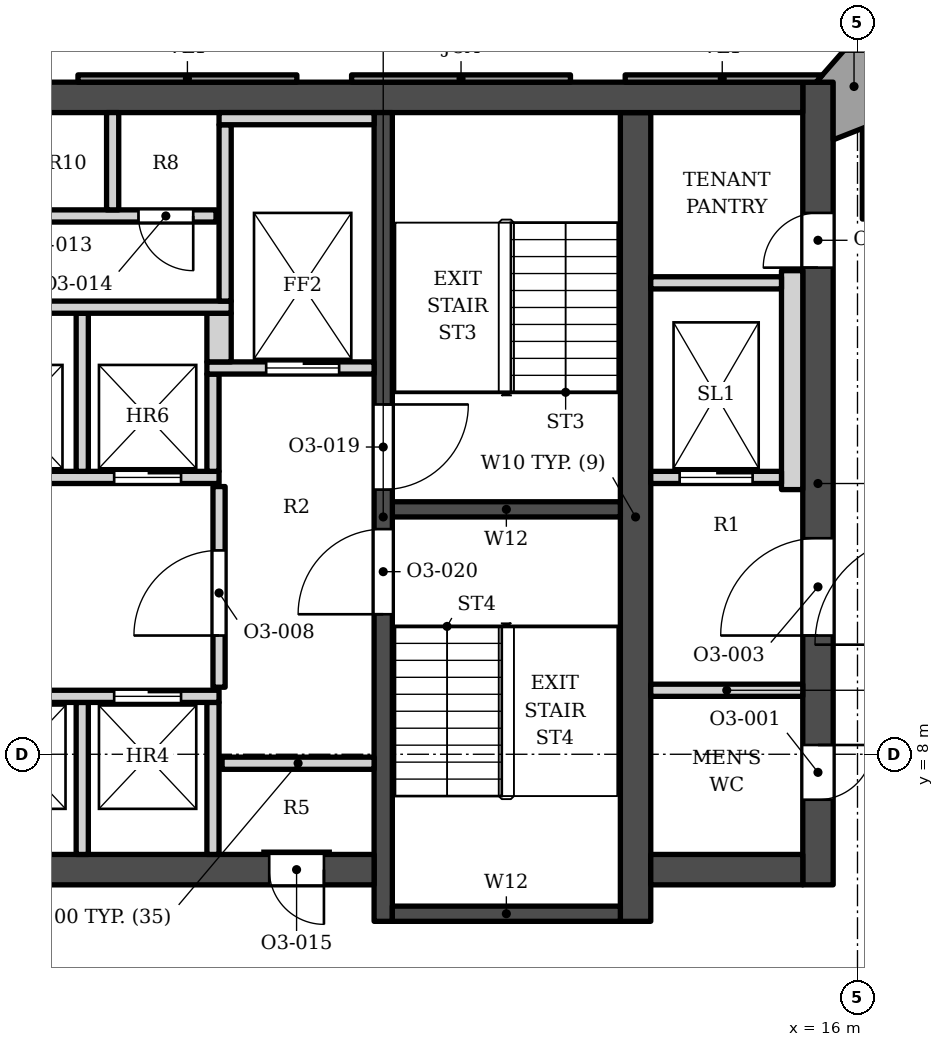
"""IFC4 building model, lengths in metres.
Left out: names, types, materials, properties, quantities, classifications, styles, units other than length and angle.
Written with IfcOpenShell. Run it as: python <this file> out.ifc"""

import sys

from ifc_helpers import new_model, si_unit, direction, frame, frame_2d, origin, place, context, subcontext, project, spatial, polyline, rectangle, outline, extrude, element, fill, save


model = new_model("IFC4")
c1 = context("Model", 3, precision=1e-05, world=origin(), true_north=direction((0.0, 1.0)))
c2 = subcontext(c1, "Body", "Model", "MODEL_VIEW")
j1 = project(units=[si_unit("LENGTHUNIT", "METRE"), si_unit("PLANEANGLEUNIT", "RADIAN")], contexts=[c1])
p1 = place(None, origin())
s1 = spatial("IfcSite", under=j1, at=p1, CompositionType="ELEMENT")
p2 = place(p1, origin())
s2 = spatial("IfcBuilding", under=s1, at=p2, CompositionType="ELEMENT")
p3 = place(p2, frame((0.0, 0.0, 168.0)))
s3 = spatial("IfcBuildingStorey", under=s2, at=p3, CompositionType="ELEMENT", Elevation=168.0)
p4 = place(p3, frame((-15.1, 18.802, 0.0), z_axis=(0.0, 0.0, 1.0), x_axis=(1.0, 0.0, 0.0)))
e1 = element("IfcWall", 1, at=p4, inside=s3, PredefinedType="SHEAR", context=c2, shape_type="SweptSolid", body=[
    extrude(rectangle(XDim=30.2, YDim=0.5, at=frame_2d((15.1, 0.0))), origin(), (0.0, 0.0, 1.0), 3.9),
])
p5 = place(p3, frame((12.35, 5.253, 0.0), z_axis=(0.0, 0.0, 1.0), x_axis=(0.0, 1.0, 0.0)))
e2 = element("IfcWall", 2, at=p5, inside=s3, PredefinedType="SHEAR", context=c2, shape_type="SweptSolid", body=[
    extrude(rectangle(XDim=13.3, YDim=0.5, at=frame_2d((6.65, 0.0))), origin(), (0.0, 0.0, 1.0), 3.9),
])
p6 = place(p3, frame((8.2, 5.253, 0.0), z_axis=(0.0, 0.0, 1.0), x_axis=(0.0, 1.0, 0.0)))
e3 = element("IfcWall", 3, at=p6, inside=s3, PredefinedType="SHEAR", context=c2, shape_type="SweptSolid", body=[
    extrude(rectangle(XDim=13.3, YDim=0.3, at=frame_2d((6.65, 0.0))), origin(), (0.0, 0.0, 1.0), 3.9),
])
p7 = place(p6, frame((7.1, 0.0, 0.0)))
e4 = element("IfcOpeningElement", 4, at=p7, cuts=e3, PredefinedType="OPENING", context=c2, shape_type="SweptSolid", body=[
    extrude(rectangle(XDim=1.4, YDim=2.1, at=frame_2d((0.7, 1.05))), frame((0.0, 0.16, 0.0), z_axis=(0.0, -1.0, 0.0), x_axis=(1.0, 0.0, 0.0)), (0.0, 0.0, 1.0), 0.32),
])
p8 = place(p6, frame((5.05, 0.0, 0.0)))
e5 = element("IfcOpeningElement", 5, at=p8, cuts=e3, PredefinedType="OPENING", context=c2, shape_type="SweptSolid", body=[
    extrude(rectangle(XDim=1.4, YDim=2.1, at=frame_2d((0.7, 1.05))), frame((0.0, 0.16, 0.0), z_axis=(0.0, -1.0, 0.0), x_axis=(1.0, 0.0, 0.0)), (0.0, 0.0, 1.0), 0.32),
])
for number, where, z_axis, x_axis in (
    (6, (8.35, 12.028, 0.0), (0.0, 0.0, 1.0), (1.0, 0.0, 0.0)),
    (7, (8.35, 5.378, 0.0), (0.0, 0.0, 1.0), (1.0, 0.0, 0.0)),
):
    element("IfcWall", number, at=place(p3, frame(where, z_axis=z_axis, x_axis=x_axis)), inside=s3, PredefinedType="SHEAR", context=c2, shape_type="SweptSolid", body=[
        extrude(rectangle(XDim=3.75, YDim=0.25, at=frame_2d((1.875, 0.0))), origin(), (0.0, 0.0, 1.0), 3.9),
    ])
p9 = place(p3, frame((1.0, 6.103, 0.0), z_axis=(0.0, 0.0, 1.0), x_axis=(1.0, 0.0, 0.0)))
e8 = element("IfcWall", 8, at=p9, inside=s3, PredefinedType="SHEAR", context=c2, shape_type="SweptSolid", body=[
    extrude(rectangle(XDim=7.05, YDim=0.5, at=frame_2d((3.525, 0.0))), origin(), (0.0, 0.0, 1.0), 3.9),
])
p10 = place(p9, frame((5.325, 0.0, 0.0)))
e9 = element("IfcOpeningElement", 9, at=p10, cuts=e8, PredefinedType="OPENING", context=c2, shape_type="SweptSolid", body=[
    extrude(rectangle(XDim=0.9, YDim=2.1, at=frame_2d((0.45, 1.05))), frame((0.0, 0.26, 0.0), z_axis=(0.0, -1.0, 0.0), x_axis=(1.0, 0.0, 0.0)), (0.0, 0.0, 1.0), 0.52),
])
p11 = place(p3, frame((12.6, 6.103, 0.0), z_axis=(0.0, 0.0, 1.0), x_axis=(1.0, 0.0, 0.0)))
e10 = element("IfcWall", 10, at=p11, inside=s3, PredefinedType="SHEAR", context=c2, shape_type="SweptSolid", body=[
    extrude(rectangle(XDim=2.5, YDim=0.5, at=frame_2d((1.25, 0.0))), origin(), (0.0, 0.0, 1.0), 3.9),
])
p12 = place(p3, frame((15.35, 5.853, 0.0), z_axis=(0.0, 0.0, 1.0), x_axis=(0.0, 1.0, 0.0)))
e11 = element("IfcWall", 11, at=p12, inside=s3, PredefinedType="SHEAR", context=c2, shape_type="SweptSolid", body=[
    extrude(rectangle(XDim=13.2, YDim=0.5, at=frame_2d((6.6, 0.0))), origin(), (0.0, 0.0, 1.0), 3.9),
])
p13 = place(p12, frame((4.1, 0.0, 0.0)))
e12 = element("IfcOpeningElement", 12, at=p13, cuts=e11, PredefinedType="OPENING", context=c2, shape_type="SweptSolid", body=[
    extrude(rectangle(XDim=1.6, YDim=2.1, at=frame_2d((0.8, 1.05))), frame((0.0, 0.26, 0.0), z_axis=(0.0, -1.0, 0.0), x_axis=(1.0, 0.0, 0.0)), (0.0, 0.0, 1.0), 0.52),
])
p14 = place(p12, frame((1.4, 0.0, 0.0)))
e13 = element("IfcOpeningElement", 13, at=p14, cuts=e11, PredefinedType="OPENING", context=c2, shape_type="SweptSolid", body=[
    extrude(rectangle(XDim=0.9, YDim=2.1, at=frame_2d((0.45, 1.05))), frame((0.0, 0.26, 0.0), z_axis=(0.0, -1.0, 0.0), x_axis=(1.0, 0.0, 0.0)), (0.0, 0.0, 1.0), 0.52),
])
p15 = place(p12, frame((10.15, 0.0, 0.0)))
e14 = element("IfcOpeningElement", 14, at=p15, cuts=e11, PredefinedType="OPENING", context=c2, shape_type="SweptSolid", body=[
    extrude(rectangle(XDim=0.9, YDim=2.1, at=frame_2d((0.45, 1.05))), frame((0.0, 0.26, 0.0), z_axis=(0.0, -1.0, 0.0), x_axis=(1.0, 0.0, 0.0)), (0.0, 0.0, 1.0), 0.52),
])
p16 = place(p3, origin())
e15 = element("IfcWall", 15, at=p16, inside=s3, PredefinedType="SOLIDWALL", context=c2, shape_type="SweptSolid", body=[
    extrude(outline(polyline([(15.6, 18.104), (16.68, 18.528), (16.68, 19.578), (15.78, 19.578), (15.32, 19.052), (15.6, 19.052), (15.6, 18.104)])), origin(), (0.0, 0.0, 1.0), 3.0),
])
p17 = place(p3, origin())
e16 = element("IfcWall", 16, at=p17, inside=s3, PredefinedType="SOLIDWALL", context=c2, shape_type="SweptSolid", body=[
    extrude(outline(polyline([(16.08, 18.292), (16.08, 16.802), (16.38, 16.802), (16.38, 18.41), (16.08, 18.292)])), origin(), (0.0, 0.0, 1.0), 3.0),
])
p18 = place(p3, origin())
e17 = element("IfcWall", 17, at=p18, inside=s3, PredefinedType="ELEMENTEDWALL", context=c2, shape_type="SweptSolid", body=[
    extrude(outline(polyline([(12.18, 19.173), (12.18, 19.052), (15.319, 19.052), (15.424, 19.173), (12.18, 19.173)])), origin(), (0.0, 0.0, 1.0), 3.0),
])
p19 = place(p3, origin())
e18 = element("IfcWall", 18, at=p19, inside=s3, PredefinedType="SOLIDWALL", context=c2, shape_type="SweptSolid", body=[
    extrude(outline(polyline([(7.68, 19.173), (7.68, 19.052), (11.28, 19.052), (11.28, 19.173), (7.68, 19.173)])), origin(), (0.0, 0.0, 1.0), 3.0),
])
p20 = place(p3, origin())
e19 = element("IfcWall", 19, at=p20, inside=s3, PredefinedType="ELEMENTEDWALL", context=c2, shape_type="SweptSolid", body=[
    extrude(outline(polyline([(3.18, 19.173), (3.18, 19.052), (6.78, 19.052), (6.78, 19.173), (3.18, 19.173)])), origin(), (0.0, 0.0, 1.0), 3.0),
])
for number, where, z_axis, x_axis in (
    (20, (3.25, 6.353, 0.0), (0.0, 0.0, 1.0), (0.0, 1.0, 0.0)),
    (21, (5.4, 6.353, 0.0), (0.0, 0.0, 1.0), (0.0, 1.0, 0.0)),
    (22, (5.55, 7.853, 0.0), (0.0, 0.0, 1.0), (1.0, 0.0, 0.0)),
):
    element("IfcWall", number, at=place(p3, frame(where, z_axis=z_axis, x_axis=x_axis)), inside=s3, PredefinedType="SOLIDWALL", context=c2, shape_type="SweptSolid", body=[
        extrude(rectangle(XDim=2.5, YDim=0.2, at=frame_2d((1.25, 0.0))), origin(), (0.0, 0.0, 1.0), 3.73),
    ])
p21 = place(p3, frame((1.0, 8.953, 0.0), z_axis=(0.0, 0.0, 1.0), x_axis=(1.0, 0.0, 0.0)))
e23 = element("IfcWall", 23, at=p21, inside=s3, PredefinedType="SOLIDWALL", context=c2, shape_type="SweptSolid", body=[
    extrude(rectangle(XDim=4.5, YDim=0.2, at=frame_2d((2.25, 0.0))), origin(), (0.0, 0.0, 1.0), 3.73),
])
p22 = place(p21, frame((0.625, 0.0, 0.0)))
e24 = element("IfcOpeningElement", 24, at=p22, cuts=e23, PredefinedType="OPENING", context=c2, shape_type="SweptSolid", body=[
    extrude(rectangle(XDim=1.1, YDim=2.1, at=frame_2d((0.55, 1.05))), frame((0.0, 0.11, 0.0), z_axis=(0.0, -1.0, 0.0), x_axis=(1.0, 0.0, 0.0)), (0.0, 0.0, 1.0), 0.22),
])
p23 = place(p21, frame((2.775, 0.0, 0.0)))
e25 = element("IfcOpeningElement", 25, at=p23, cuts=e23, PredefinedType="OPENING", context=c2, shape_type="SweptSolid", body=[
    extrude(rectangle(XDim=1.1, YDim=2.1, at=frame_2d((0.55, 1.05))), frame((0.0, 0.11, 0.0), z_axis=(0.0, -1.0, 0.0), x_axis=(1.0, 0.0, 0.0)), (0.0, 0.0, 1.0), 0.22),
])
p24 = place(p3, frame((12.6, 9.052, 0.0), z_axis=(0.0, 0.0, 1.0), x_axis=(1.0, 0.0, 0.0)))
e26 = element("IfcWall", 26, at=p24, inside=s3, PredefinedType="PARTITIONING", context=c2, shape_type="SweptSolid", body=[
    extrude(rectangle(XDim=2.5, YDim=0.2, at=frame_2d((1.25, 0.0))), origin(), (0.0, 0.0, 1.0), 3.73),
])
p25 = place(p3, frame((5.5, 9.103, 0.0), z_axis=(0.0, 0.0, 1.0), x_axis=(0.0, 1.0, 0.0)))
e27 = element("IfcWall", 27, at=p25, inside=s3, PredefinedType="SOLIDWALL", context=c2, shape_type="SweptSolid", body=[
    extrude(rectangle(XDim=3.3, YDim=0.2, at=frame_2d((1.65, 0.0))), origin(), (0.0, 0.0, 1.0), 3.73),
])
p26 = place(p25, frame((0.85, 0.0, 0.0)))
e28 = element("IfcOpeningElement", 28, at=p26, cuts=e27, PredefinedType="OPENING", context=c2, shape_type="SweptSolid", body=[
    extrude(rectangle(XDim=1.4, YDim=2.1, at=frame_2d((0.7, 1.05))), frame((0.0, 0.11, 0.0), z_axis=(0.0, -1.0, 0.0), x_axis=(1.0, 0.0, 0.0)), (0.0, 0.0, 1.0), 0.22),
])
p27 = place(p3, frame((14.925, 12.353, 0.0), z_axis=(0.0, 0.0, 1.0), x_axis=(0.0, 1.0, 0.0)))
e29 = element("IfcWall", 29, at=p27, inside=s3, PredefinedType="SOLIDWALL", context=c2, shape_type="SweptSolid", body=[
    extrude(rectangle(XDim=3.6, YDim=0.35, at=frame_2d((1.8, 0.0))), origin(), (0.0, 0.0, 1.0), 3.73),
])
p28 = place(p3, frame((-1.5, 12.552, 0.0), z_axis=(0.0, 0.0, 1.0), x_axis=(1.0, 0.0, 0.0)))
e30 = element("IfcWall", 30, at=p28, inside=s3, PredefinedType="SOLIDWALL", context=c2, shape_type="SweptSolid", body=[
    extrude(rectangle(XDim=7.0, YDim=0.2, at=frame_2d((3.5, 0.0))), origin(), (0.0, 0.0, 1.0), 3.73),
])
p29 = place(p28, frame((3.075, 0.0, 0.0)))
e31 = element("IfcOpeningElement", 31, at=p29, cuts=e30, PredefinedType="OPENING", context=c2, shape_type="SweptSolid", body=[
    extrude(rectangle(XDim=1.1, YDim=2.1, at=frame_2d((0.55, 1.05))), frame((0.0, 0.11, 0.0), z_axis=(0.0, -1.0, 0.0), x_axis=(1.0, 0.0, 0.0)), (0.0, 0.0, 1.0), 0.22),
])
p30 = place(p28, frame((5.275, 0.0, 0.0)))
e32 = element("IfcOpeningElement", 32, at=p30, cuts=e30, PredefinedType="OPENING", context=c2, shape_type="SweptSolid", body=[
    extrude(rectangle(XDim=1.1, YDim=2.1, at=frame_2d((0.55, 1.05))), frame((0.0, 0.11, 0.0), z_axis=(0.0, -1.0, 0.0), x_axis=(1.0, 0.0, 0.0)), (0.0, 0.0, 1.0), 0.22),
])
p31 = place(p3, frame((12.6, 12.552, 0.0), z_axis=(0.0, 0.0, 1.0), x_axis=(1.0, 0.0, 0.0)))
e33 = element("IfcWall", 33, at=p31, inside=s3, PredefinedType="SOLIDWALL", context=c2, shape_type="SweptSolid", body=[
    extrude(rectangle(XDim=2.15, YDim=0.2, at=frame_2d((1.075, 0.0))), origin(), (0.0, 0.0, 1.0), 3.73),
])
p32 = place(p31, frame((0.475, 0.0, 0.0)))
e34 = element("IfcOpeningElement", 34, at=p32, cuts=e33, PredefinedType="OPENING", context=c2, shape_type="SweptSolid", body=[
    extrude(rectangle(XDim=1.2, YDim=2.1, at=frame_2d((0.6, 1.05))), frame((0.0, 0.11, 0.0), z_axis=(0.0, -1.0, 0.0), x_axis=(1.0, 0.0, 0.0)), (0.0, 0.0, 1.0), 0.22),
])
p33 = place(p3, frame((3.25, 12.653, 0.0), z_axis=(0.0, 0.0, 1.0), x_axis=(0.0, 1.0, 0.0)))
e35 = element("IfcWall", 35, at=p33, inside=s3, PredefinedType="SOLIDWALL", context=c2, shape_type="SweptSolid", body=[
    extrude(rectangle(XDim=2.6, YDim=0.2, at=frame_2d((1.3, 0.0))), origin(), (0.0, 0.0, 1.0), 3.73),
])
p34 = place(p3, frame((5.4, 12.653, 0.0), z_axis=(0.0, 0.0, 1.0), x_axis=(0.0, 1.0, 0.0)))
e36 = element("IfcWall", 36, at=p34, inside=s3, PredefinedType="SOLIDWALL", context=c2, shape_type="SweptSolid", body=[
    extrude(rectangle(XDim=1.6, YDim=0.2, at=frame_2d((0.8, 0.0))), origin(), (0.0, 0.0, 1.0), 3.73),
])
p35 = place(p3, frame((5.3, 14.353, 0.0), z_axis=(0.0, 0.0, 1.0), x_axis=(1.0, 0.0, 0.0)))
e37 = element("IfcWall", 37, at=p35, inside=s3, PredefinedType="SOLIDWALL", context=c2, shape_type="SweptSolid", body=[
    extrude(rectangle(XDim=2.75, YDim=0.2, at=frame_2d((1.375, 0.0))), origin(), (0.0, 0.0, 1.0), 3.73),
])
p36 = place(p35, frame((0.975, 0.0, 0.0)))
e38 = element("IfcOpeningElement", 38, at=p36, cuts=e37, PredefinedType="OPENING", context=c2, shape_type="SweptSolid", body=[
    extrude(rectangle(XDim=1.2, YDim=2.1, at=frame_2d((0.6, 1.05))), frame((0.0, 0.11, 0.0), z_axis=(0.0, -1.0, 0.0), x_axis=(1.0, 0.0, 0.0)), (0.0, 0.0, 1.0), 0.22),
])
p37 = place(p3, frame((5.5, 14.453, 0.0), z_axis=(0.0, 0.0, 1.0), x_axis=(0.0, 1.0, 0.0)))
e39 = element("IfcWall", 39, at=p37, inside=s3, PredefinedType="SOLIDWALL", context=c2, shape_type="SweptSolid", body=[
    extrude(rectangle(XDim=0.8, YDim=0.4, at=frame_2d((0.4, 0.0))), origin(), (0.0, 0.0, 1.0), 3.73),
])
p38 = place(p3, frame((-1.5, 15.353, 0.0), z_axis=(0.0, 0.0, 1.0), x_axis=(1.0, 0.0, 0.0)))
e40 = element("IfcWall", 40, at=p38, inside=s3, PredefinedType="SOLIDWALL", context=c2, shape_type="SweptSolid", body=[
    extrude(rectangle(XDim=7.2, YDim=0.2, at=frame_2d((3.6, 0.0))), origin(), (0.0, 0.0, 1.0), 3.73),
])
p39 = place(p3, frame((5.6, 15.453, 0.0), z_axis=(0.0, 0.0, 1.0), x_axis=(0.0, 1.0, 0.0)))
e41 = element("IfcWall", 41, at=p39, inside=s3, PredefinedType="SOLIDWALL", context=c2, shape_type="SweptSolid", body=[
    extrude(rectangle(XDim=2.9, YDim=0.2, at=frame_2d((1.45, 0.0))), origin(), (0.0, 0.0, 1.0), 3.73),
])
p40 = place(p3, frame((12.6, 15.753, 0.0), z_axis=(0.0, 0.0, 1.0), x_axis=(1.0, 0.0, 0.0)))
e42 = element("IfcWall", 42, at=p40, inside=s3, PredefinedType="SOLIDWALL", context=c2, shape_type="SweptSolid", body=[
    extrude(rectangle(XDim=2.15, YDim=0.2, at=frame_2d((1.075, 0.0))), origin(), (0.0, 0.0, 1.0), 3.73),
])
p41 = place(p3, frame((-1.6, 16.853, 0.0), z_axis=(0.0, 0.0, 1.0), x_axis=(1.0, 0.0, 0.0)))
e43 = element("IfcWall", 43, at=p41, inside=s3, PredefinedType="SOLIDWALL", context=c2, shape_type="SweptSolid", body=[
    extrude(rectangle(XDim=7.05, YDim=0.2, at=frame_2d((3.525, 0.0))), origin(), (0.0, 0.0, 1.0), 3.73),
])
p42 = place(p41, frame((0.525, 0.0, 0.0)))
e44 = element("IfcOpeningElement", 44, at=p42, cuts=e43, PredefinedType="OPENING", context=c2, shape_type="SweptSolid", body=[
    extrude(rectangle(XDim=0.9, YDim=2.1, at=frame_2d((0.45, 1.05))), frame((0.0, 0.11, 0.0), z_axis=(0.0, -1.0, 0.0), x_axis=(1.0, 0.0, 0.0)), (0.0, 0.0, 1.0), 0.22),
])
p43 = place(p41, frame((3.15, 0.0, 0.0)))
e45 = element("IfcOpeningElement", 45, at=p43, cuts=e43, PredefinedType="OPENING", context=c2, shape_type="SweptSolid", body=[
    extrude(rectangle(XDim=0.9, YDim=2.1, at=frame_2d((0.45, 1.05))), frame((0.0, 0.11, 0.0), z_axis=(0.0, -1.0, 0.0), x_axis=(1.0, 0.0, 0.0)), (0.0, 0.0, 1.0), 0.22),
])
p44 = place(p41, frame((5.775, 0.0, 0.0)))
e46 = element("IfcOpeningElement", 46, at=p44, cuts=e43, PredefinedType="OPENING", context=c2, shape_type="SweptSolid", body=[
    extrude(rectangle(XDim=0.9, YDim=2.1, at=frame_2d((0.45, 1.05))), frame((0.0, 0.11, 0.0), z_axis=(0.0, -1.0, 0.0), x_axis=(1.0, 0.0, 0.0)), (0.0, 0.0, 1.0), 0.22),
])
p45 = place(p3, frame((3.75, 16.953, 0.0), z_axis=(0.0, 0.0, 1.0), x_axis=(0.0, 1.0, 0.0)))
e47 = element("IfcWall", 47, at=p45, inside=s3, PredefinedType="PARTITIONING", context=c2, shape_type="SweptSolid", body=[
    extrude(rectangle(XDim=1.6, YDim=0.2, at=frame_2d((0.8, 0.0))), origin(), (0.0, 0.0, 1.0), 3.73),
])
p46 = place(p3, frame((5.5, 18.453, 0.0), z_axis=(0.0, 0.0, 1.0), x_axis=(1.0, 0.0, 0.0)))
e48 = element("IfcWall", 48, at=p46, inside=s3, PredefinedType="SOLIDWALL", context=c2, shape_type="SweptSolid", body=[
    extrude(rectangle(XDim=2.55, YDim=0.2, at=frame_2d((1.275, 0.0))), origin(), (0.0, 0.0, 1.0), 3.73),
])
p47 = place(p23, origin())
e49 = element("IfcDoor", 49, at=p47, inside=s3, OperationType="DOUBLE_DOOR_SLIDING", PredefinedType="DOOR", context=c2, shape_type="SweptSolid", body=[
    extrude(rectangle(XDim=1.1, YDim=2.1, at=frame_2d((0.55, 1.05))), frame((0.0, 0.025, 0.0), z_axis=(0.0, -1.0, 0.0), x_axis=(1.0, 0.0, 0.0)), (0.0, 0.0, 1.0), 0.05),
])
fill(e25, e49)
p48 = place(p30, origin())
e50 = element("IfcDoor", 50, at=p48, inside=s3, OperationType="DOUBLE_DOOR_SLIDING", PredefinedType="DOOR", context=c2, shape_type="SweptSolid", body=[
    extrude(rectangle(XDim=1.1, YDim=2.1, at=frame_2d((0.55, 1.05))), frame((0.0, 0.025, 0.0), z_axis=(0.0, -1.0, 0.0), x_axis=(1.0, 0.0, 0.0)), (0.0, 0.0, 1.0), 0.05),
])
fill(e32, e50)
p49 = place(p36, origin())
e51 = element("IfcDoor", 51, at=p49, inside=s3, OperationType="DOUBLE_DOOR_SLIDING", PredefinedType="DOOR", context=c2, shape_type="SweptSolid", body=[
    extrude(rectangle(XDim=1.2, YDim=2.1, at=frame_2d((0.6, 1.05))), frame((0.0, 0.025, 0.0), z_axis=(0.0, -1.0, 0.0), x_axis=(1.0, 0.0, 0.0)), (0.0, 0.0, 1.0), 0.05),
])
fill(e38, e51)
p50 = place(p32, origin())
e52 = element("IfcDoor", 52, at=p50, inside=s3, OperationType="DOUBLE_DOOR_SLIDING", PredefinedType="DOOR", context=c2, shape_type="SweptSolid", body=[
    extrude(rectangle(XDim=1.2, YDim=2.1, at=frame_2d((0.6, 1.05))), frame((0.0, 0.025, 0.0), z_axis=(0.0, -1.0, 0.0), x_axis=(1.0, 0.0, 0.0)), (0.0, 0.0, 1.0), 0.05),
])
fill(e34, e52)
p51 = place(p7, origin())
e53 = element("IfcDoor", 53, at=p51, inside=s3, OperationType="SINGLE_SWING_RIGHT", PredefinedType="DOOR", context=c2, shape_type="SweptSolid", body=[
    extrude(rectangle(XDim=1.4, YDim=2.1, at=frame_2d((0.7, 1.05))), frame((0.0, 0.025, 0.0), z_axis=(0.0, -1.0, 0.0), x_axis=(1.0, 0.0, 0.0)), (0.0, 0.0, 1.0), 0.05),
])
fill(e4, e53)
p52 = place(p8, origin())
e54 = element("IfcDoor", 54, at=p52, inside=s3, OperationType="SINGLE_SWING_LEFT", PredefinedType="DOOR", context=c2, shape_type="SweptSolid", body=[
    extrude(rectangle(XDim=1.4, YDim=2.1, at=frame_2d((0.7, 1.05))), frame((0.0, 0.025, 0.0), z_axis=(0.0, -1.0, 0.0), x_axis=(1.0, 0.0, 0.0)), (0.0, 0.0, 1.0), 0.05),
])
fill(e5, e54)
p53 = place(p26, origin())
e55 = element("IfcDoor", 55, at=p53, inside=s3, OperationType="SINGLE_SWING_LEFT", PredefinedType="DOOR", context=c2, shape_type="SweptSolid", body=[
    extrude(rectangle(XDim=1.4, YDim=2.1, at=frame_2d((0.7, 1.05))), frame((0.0, 0.025, 0.0), z_axis=(0.0, -1.0, 0.0), x_axis=(1.0, 0.0, 0.0)), (0.0, 0.0, 1.0), 0.05),
])
fill(e28, e55)
p54 = place(p44, origin())
e56 = element("IfcDoor", 56, at=p54, inside=s3, OperationType="SINGLE_SWING_RIGHT", PredefinedType="DOOR", context=c2, shape_type="SweptSolid", body=[
    extrude(rectangle(XDim=0.9, YDim=2.1, at=frame_2d((0.45, 1.05))), frame((0.0, 0.025, 0.0), z_axis=(0.0, -1.0, 0.0), x_axis=(1.0, 0.0, 0.0)), (0.0, 0.0, 1.0), 0.05),
])
fill(e46, e56)
p55 = place(p10, origin())
e57 = element("IfcDoor", 57, at=p55, inside=s3, OperationType="SINGLE_SWING_RIGHT", PredefinedType="DOOR", context=c2, shape_type="SweptSolid", body=[
    extrude(rectangle(XDim=0.9, YDim=2.1, at=frame_2d((0.45, 1.05))), frame((0.0, 0.025, 0.0), z_axis=(0.0, -1.0, 0.0), x_axis=(1.0, 0.0, 0.0)), (0.0, 0.0, 1.0), 0.05),
])
fill(e9, e57)
p56 = place(p13, origin())
e58 = element("IfcDoor", 58, at=p56, inside=s3, OperationType="DOUBLE_DOOR_SINGLE_SWING", PredefinedType="DOOR", context=c2, shape_type="SweptSolid", body=[
    extrude(rectangle(XDim=1.6, YDim=2.1, at=frame_2d((0.8, 1.05))), frame((0.0, 0.025, 0.0), z_axis=(0.0, -1.0, 0.0), x_axis=(1.0, 0.0, 0.0)), (0.0, 0.0, 1.0), 0.05),
])
fill(e12, e58)
p57 = place(p14, origin())
e59 = element("IfcDoor", 59, at=p57, inside=s3, OperationType="SINGLE_SWING_RIGHT", PredefinedType="DOOR", context=c2, shape_type="SweptSolid", body=[
    extrude(rectangle(XDim=0.9, YDim=2.1, at=frame_2d((0.45, 1.05))), frame((0.0, 0.025, 0.0), z_axis=(0.0, -1.0, 0.0), x_axis=(1.0, 0.0, 0.0)), (0.0, 0.0, 1.0), 0.05),
])
fill(e13, e59)
p58 = place(p15, origin())
e60 = element("IfcDoor", 60, at=p58, inside=s3, OperationType="SINGLE_SWING_LEFT", PredefinedType="DOOR", context=c2, shape_type="SweptSolid", body=[
    extrude(rectangle(XDim=0.9, YDim=2.1, at=frame_2d((0.45, 1.05))), frame((0.0, 0.025, 0.0), z_axis=(0.0, -1.0, 0.0), x_axis=(1.0, 0.0, 0.0)), (0.0, 0.0, 1.0), 0.05),
])
fill(e14, e60)
save(model, sys.argv[1])
